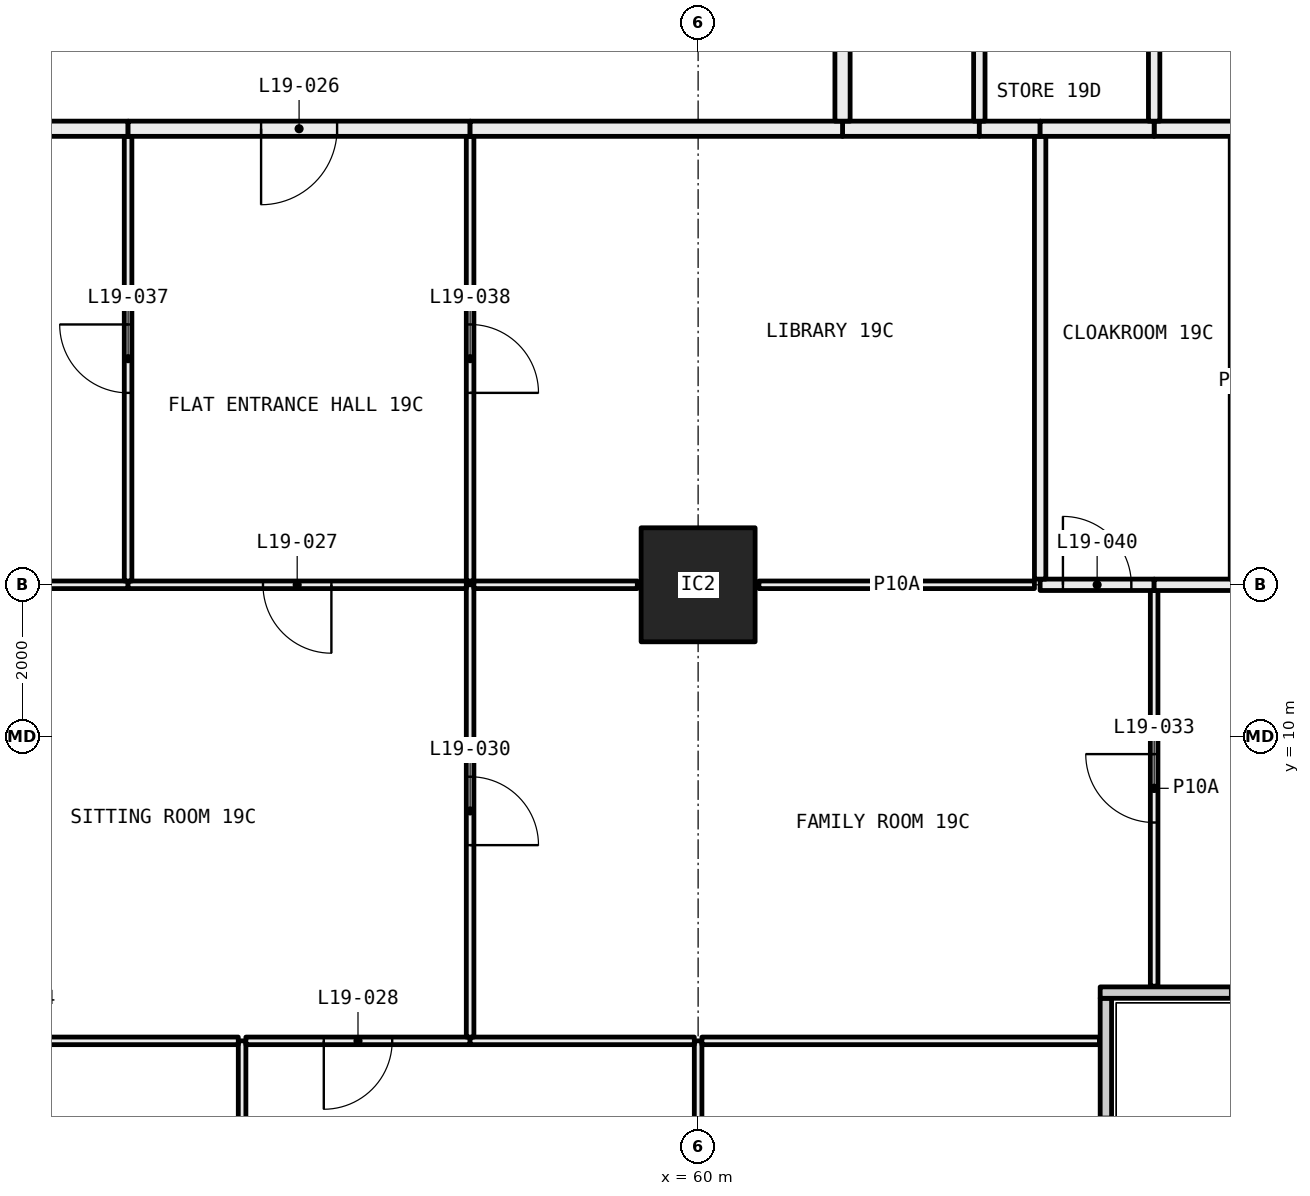
"""IFC4 building model, lengths in metres.
Left out: names, types, materials, properties, quantities, classifications, styles, units other than length and angle.
Written with IfcOpenShell. Run it as: python <this file> out.ifc"""

import sys

from ifc_helpers import new_model, si_unit, direction, frame, frame_2d, origin, origin_2d, place, context, subcontext, project, spatial, rectangle, hollow_rectangle, extrude, element, fill, save


model = new_model("IFC4")
c1 = context("Model", 3, precision=1e-05, world=origin(), true_north=direction((0.0, 1.0)))
c2 = subcontext(c1, "Body", "Model", "MODEL_VIEW")
j1 = project(units=[si_unit("LENGTHUNIT", "METRE"), si_unit("PLANEANGLEUNIT", "RADIAN")], contexts=[c1])
p1 = place(None, origin())
s1 = spatial("IfcSite", under=j1, at=p1, CompositionType="ELEMENT")
p2 = place(p1, origin())
s2 = spatial("IfcBuilding", under=s1, at=p2, CompositionType="ELEMENT")
p3 = place(p2, frame((0.0, 0.0, 78.3)))
s3 = spatial("IfcBuildingStorey", under=s2, at=p3, CompositionType="ELEMENT", Elevation=78.3)
p4 = place(p3, frame((60.0, 12.0, 0.0), z_axis=(0.0, 0.0, 1.0), x_axis=(1.0, 0.0, 0.0)))
e1 = element("IfcColumn", 1, at=p4, inside=s3, PredefinedType="COLUMN", context=c2, shape_type="SweptSolid", body=[
    extrude(hollow_rectangle(XDim=1.5, YDim=1.5, WallThickness=0.065, at=origin_2d()), origin(), (0.0, 0.0, 1.0), 3.05),
])
p5 = place(p3, frame((65.365, 0.71, 0.0), z_axis=(0.0, 0.0, 1.0), x_axis=(0.0, 1.0, 0.0)))
e2 = element("IfcWall", 2, at=p5, inside=s3, PredefinedType="ELEMENTEDWALL", context=c2, shape_type="SweptSolid", body=[
    extrude(rectangle(XDim=5.85, YDim=0.15, at=frame_2d((2.925, 0.0))), origin(), (0.0, 0.0, 1.0), 3.05),
])
p6 = place(p5, frame((0.29, 0.0, 0.45)))
e3 = element("IfcOpeningElement", 3, at=p6, cuts=e2, PredefinedType="OPENING", context=c2, shape_type="SweptSolid", body=[
    extrude(rectangle(XDim=4.0, YDim=2.55, at=frame_2d((2.0, 1.275))), frame((0.0, 0.085, 0.0), z_axis=(0.0, -1.0, 0.0), x_axis=(1.0, 0.0, 0.0)), (0.0, 0.0, 1.0), 0.17),
])
p7 = place(p3, frame((65.29, 6.635, 0.0), z_axis=(0.0, 0.0, 1.0), x_axis=(1.0, 0.0, 0.0)))
e4 = element("IfcWall", 4, at=p7, inside=s3, PredefinedType="ELEMENTEDWALL", context=c2, shape_type="SweptSolid", body=[
    extrude(rectangle(XDim=6.15, YDim=0.15, at=frame_2d((3.075, 0.0))), origin(), (0.0, 0.0, 1.0), 3.05),
])
p8 = place(p7, frame((1.71, 0.0, 0.45)))
e5 = element("IfcOpeningElement", 5, at=p8, cuts=e4, PredefinedType="OPENING", context=c2, shape_type="SweptSolid", body=[
    extrude(rectangle(XDim=4.0, YDim=2.55, at=frame_2d((2.0, 1.275))), frame((0.0, 0.085, 0.0), z_axis=(0.0, -1.0, 0.0), x_axis=(1.0, 0.0, 0.0)), (0.0, 0.0, 1.0), 0.17),
])
p9 = place(p3, frame((54.0, 0.72, 0.0), z_axis=(0.0, 0.0, 1.0), x_axis=(0.0, 1.0, 0.0)))
e6 = element("IfcWall", 6, at=p9, inside=s3, PredefinedType="PARTITIONING", context=c2, shape_type="SweptSolid", body=[
    extrude(rectangle(XDim=5.28, YDim=0.1, at=frame_2d((2.64, 0.0))), origin(), (0.0, 0.0, 1.0), 3.05),
])
p10 = place(p3, frame((53.95, 6.0, 0.0), z_axis=(0.0, 0.0, 1.0), x_axis=(-1.0, 0.0, 0.0)))
e7 = element("IfcWall", 7, at=p10, inside=s3, PredefinedType="PARTITIONING", context=c2, shape_type="SweptSolid", body=[
    extrude(rectangle(XDim=5.9, YDim=0.1, at=frame_2d((2.95, 0.0))), origin(), (0.0, 0.0, 1.0), 2.45),
])
p11 = place(p10, frame((2.5, 0.0, 0.0)))
e8 = element("IfcOpeningElement", 8, at=p11, cuts=e7, PredefinedType="OPENING", context=c2, shape_type="SweptSolid", body=[
    extrude(rectangle(XDim=0.9, YDim=2.1, at=frame_2d((0.45, 1.05))), frame((0.0, 0.06, 0.0), z_axis=(0.0, -1.0, 0.0), x_axis=(1.0, 0.0, 0.0)), (0.0, 0.0, 1.0), 0.12),
])
p12 = place(p3, frame((60.0, 0.72, 0.0), z_axis=(0.0, 0.0, 1.0), x_axis=(0.0, 1.0, 0.0)))
e9 = element("IfcWall", 9, at=p12, inside=s3, PredefinedType="PARTITIONING", context=c2, shape_type="SweptSolid", body=[
    extrude(rectangle(XDim=5.28, YDim=0.1, at=frame_2d((2.64, 0.0))), origin(), (0.0, 0.0, 1.0), 2.45),
])
p13 = place(p12, frame((2.19, 0.0, 0.0)))
e10 = element("IfcOpeningElement", 10, at=p13, cuts=e9, PredefinedType="OPENING", context=c2, shape_type="SweptSolid", body=[
    extrude(rectangle(XDim=0.9, YDim=2.1, at=frame_2d((0.45, 1.05))), frame((0.0, 0.06, 0.0), z_axis=(0.0, -1.0, 0.0), x_axis=(1.0, 0.0, 0.0)), (0.0, 0.0, 1.0), 0.12),
])
p14 = place(p3, frame((57.0, 6.0, 0.0), z_axis=(0.0, 0.0, 1.0), x_axis=(-1.0, 0.0, 0.0)))
e11 = element("IfcWall", 11, at=p14, inside=s3, PredefinedType="PARTITIONING", context=c2, shape_type="SweptSolid", body=[
    extrude(rectangle(XDim=2.95, YDim=0.1, at=frame_2d((1.475, 0.0))), origin(), (0.0, 0.0, 1.0), 3.05),
])
p15 = place(p14, frame((1.025, 0.0, 0.0)))
e12 = element("IfcOpeningElement", 12, at=p15, cuts=e11, PredefinedType="OPENING", context=c2, shape_type="SweptSolid", body=[
    extrude(rectangle(XDim=0.9, YDim=2.1, at=frame_2d((0.45, 1.05))), frame((0.0, 0.06, 0.0), z_axis=(0.0, -1.0, 0.0), x_axis=(1.0, 0.0, 0.0)), (0.0, 0.0, 1.0), 0.12),
])
p16 = place(p3, frame((59.95, 6.0, 0.0), z_axis=(0.0, 0.0, 1.0), x_axis=(-1.0, 0.0, 0.0)))
e13 = element("IfcWall", 13, at=p16, inside=s3, PredefinedType="PARTITIONING", context=c2, shape_type="SweptSolid", body=[
    extrude(rectangle(XDim=2.95, YDim=0.1, at=frame_2d((1.475, 0.0))), origin(), (0.0, 0.0, 1.0), 2.45),
])
p17 = place(p3, frame((65.28, 6.0, 0.0), z_axis=(0.0, 0.0, 1.0), x_axis=(-1.0, 0.0, 0.0)))
e14 = element("IfcWall", 14, at=p17, inside=s3, PredefinedType="PARTITIONING", context=c2, shape_type="SweptSolid", body=[
    extrude(rectangle(XDim=5.23, YDim=0.1, at=frame_2d((2.615, 0.0))), origin(), (0.0, 0.0, 1.0), 2.45),
])
p18 = place(p3, frame((57.0, 6.05, 0.0), z_axis=(0.0, 0.0, 1.0), x_axis=(0.0, 1.0, 0.0)))
e15 = element("IfcWall", 15, at=p18, inside=s3, PredefinedType="PARTITIONING", context=c2, shape_type="SweptSolid", body=[
    extrude(rectangle(XDim=5.95, YDim=0.1, at=frame_2d((2.975, 0.0))), origin(), (0.0, 0.0, 1.0), 2.45),
])
p19 = place(p18, frame((2.525, 0.0, 0.0)))
e16 = element("IfcOpeningElement", 16, at=p19, cuts=e15, PredefinedType="OPENING", context=c2, shape_type="SweptSolid", body=[
    extrude(rectangle(XDim=0.9, YDim=2.1, at=frame_2d((0.45, 1.05))), frame((0.0, 0.06, 0.0), z_axis=(0.0, -1.0, 0.0), x_axis=(1.0, 0.0, 0.0)), (0.0, 0.0, 1.0), 0.12),
])
p20 = place(p3, frame((52.5, 12.0, 0.0), z_axis=(0.0, 0.0, 1.0), x_axis=(-1.0, 0.0, 0.0)))
e17 = element("IfcWall", 17, at=p20, inside=s3, PredefinedType="PARTITIONING", context=c2, shape_type="SweptSolid", body=[
    extrude(rectangle(XDim=3.7, YDim=0.1, at=frame_2d((1.85, 0.0))), origin(), (0.0, 0.0, 1.0), 2.45),
])
p21 = place(p3, frame((56.95, 12.0, 0.0), z_axis=(0.0, 0.0, 1.0), x_axis=(-1.0, 0.0, 0.0)))
e18 = element("IfcWall", 18, at=p21, inside=s3, PredefinedType="PARTITIONING", context=c2, shape_type="SweptSolid", body=[
    extrude(rectangle(XDim=4.45, YDim=0.1, at=frame_2d((2.225, 0.0))), origin(), (0.0, 0.0, 1.0), 2.45),
])
p22 = place(p21, frame((1.775, 0.0, 0.0)))
e19 = element("IfcOpeningElement", 19, at=p22, cuts=e18, PredefinedType="OPENING", context=c2, shape_type="SweptSolid", body=[
    extrude(rectangle(XDim=0.9, YDim=2.1, at=frame_2d((0.45, 1.05))), frame((0.0, 0.06, 0.0), z_axis=(0.0, -1.0, 0.0), x_axis=(1.0, 0.0, 0.0)), (0.0, 0.0, 1.0), 0.12),
])
p23 = place(p3, frame((66.0, 6.72, 0.0), z_axis=(0.0, 0.0, 1.0), x_axis=(0.0, 1.0, 0.0)))
e20 = element("IfcWall", 20, at=p23, inside=s3, PredefinedType="PARTITIONING", context=c2, shape_type="SweptSolid", body=[
    extrude(rectangle(XDim=5.205, YDim=0.1, at=frame_2d((2.603, 0.0))), origin(), (0.0, 0.0, 1.0), 2.45),
])
p24 = place(p23, frame((2.153, 0.0, 0.0)))
e21 = element("IfcOpeningElement", 21, at=p24, cuts=e20, PredefinedType="OPENING", context=c2, shape_type="SweptSolid", body=[
    extrude(rectangle(XDim=0.9, YDim=2.1, at=frame_2d((0.45, 1.05))), frame((0.0, 0.06, 0.0), z_axis=(0.0, -1.0, 0.0), x_axis=(1.0, 0.0, 0.0)), (0.0, 0.0, 1.0), 0.12),
])
p25 = place(p3, frame((59.2, 12.0, 0.0), z_axis=(0.0, 0.0, 1.0), x_axis=(-1.0, 0.0, 0.0)))
e22 = element("IfcWall", 22, at=p25, inside=s3, PredefinedType="PARTITIONING", context=c2, shape_type="SweptSolid", body=[
    extrude(rectangle(XDim=2.15, YDim=0.1, at=frame_2d((1.075, 0.0))), origin(), (0.0, 0.0, 1.0), 2.45),
])
p26 = place(p3, frame((64.425, 12.0, 0.0), z_axis=(0.0, 0.0, 1.0), x_axis=(-1.0, 0.0, 0.0)))
e23 = element("IfcWall", 23, at=p26, inside=s3, PredefinedType="PARTITIONING", context=c2, shape_type="SweptSolid", body=[
    extrude(rectangle(XDim=3.625, YDim=0.1, at=frame_2d((1.812, 0.0))), origin(), (0.0, 0.0, 1.0), 2.45),
])
p27 = place(p3, frame((66.0, 12.0, 0.0), z_axis=(0.0, 0.0, 1.0), x_axis=(-1.0, 0.0, 0.0)))
e24 = element("IfcWall", 24, at=p27, inside=s3, PredefinedType="PARTITIONING", context=c2, shape_type="SweptSolid", body=[
    extrude(rectangle(XDim=1.5, YDim=0.15, at=frame_2d((0.75, 0.0))), origin(), (0.0, 0.0, 1.0), 2.45),
])
p28 = place(p27, frame((0.3, 0.0, 0.0)))
e25 = element("IfcOpeningElement", 25, at=p28, cuts=e24, PredefinedType="OPENING", context=c2, shape_type="SweptSolid", body=[
    extrude(rectangle(XDim=0.9, YDim=2.1, at=frame_2d((0.45, 1.05))), frame((0.0, 0.085, 0.0), z_axis=(0.0, -1.0, 0.0), x_axis=(1.0, 0.0, 0.0)), (0.0, 0.0, 1.0), 0.17),
])
p29 = place(p3, frame((67.076, 12.0, 0.0), z_axis=(0.0, 0.0, 1.0), x_axis=(-1.0, 0.0, 0.0)))
e26 = element("IfcWall", 26, at=p29, inside=s3, PredefinedType="PARTITIONING", context=c2, shape_type="SweptSolid", body=[
    extrude(rectangle(XDim=1.076, YDim=0.15, at=frame_2d((0.538, 0.0))), origin(), (0.0, 0.0, 1.0), 2.45),
])
p30 = place(p3, frame((52.5, 12.05, 0.0), z_axis=(0.0, 0.0, 1.0), x_axis=(0.0, 1.0, 0.0)))
e27 = element("IfcWall", 27, at=p30, inside=s3, PredefinedType="PARTITIONING", context=c2, shape_type="SweptSolid", body=[
    extrude(rectangle(XDim=5.85, YDim=0.1, at=frame_2d((2.925, 0.0))), origin(), (0.0, 0.0, 1.0), 2.45),
])
p31 = place(p30, frame((2.475, 0.0, 0.0)))
e28 = element("IfcOpeningElement", 28, at=p31, cuts=e27, PredefinedType="OPENING", context=c2, shape_type="SweptSolid", body=[
    extrude(rectangle(XDim=0.9, YDim=2.1, at=frame_2d((0.45, 1.05))), frame((0.0, 0.06, 0.0), z_axis=(0.0, -1.0, 0.0), x_axis=(1.0, 0.0, 0.0)), (0.0, 0.0, 1.0), 0.12),
])
p32 = place(p3, frame((52.5, 18.0, 0.0), z_axis=(0.0, 0.0, 1.0), x_axis=(-1.0, 0.0, 0.0)))
e29 = element("IfcWall", 29, at=p32, inside=s3, PredefinedType="PARTITIONING", context=c2, shape_type="SweptSolid", body=[
    extrude(rectangle(XDim=6.4, YDim=0.2, at=frame_2d((3.2, 0.0))), origin(), (0.0, 0.0, 1.0), 3.05),
])
p33 = place(p3, frame((57.0, 12.05, 0.0), z_axis=(0.0, 0.0, 1.0), x_axis=(0.0, 1.0, 0.0)))
e30 = element("IfcWall", 30, at=p33, inside=s3, PredefinedType="PARTITIONING", context=c2, shape_type="SweptSolid", body=[
    extrude(rectangle(XDim=5.85, YDim=0.1, at=frame_2d((2.925, 0.0))), origin(), (0.0, 0.0, 1.0), 2.45),
])
p34 = place(p33, frame((2.475, 0.0, 0.0)))
e31 = element("IfcOpeningElement", 31, at=p34, cuts=e30, PredefinedType="OPENING", context=c2, shape_type="SweptSolid", body=[
    extrude(rectangle(XDim=0.9, YDim=2.1, at=frame_2d((0.45, 1.05))), frame((0.0, 0.06, 0.0), z_axis=(0.0, -1.0, 0.0), x_axis=(1.0, 0.0, 0.0)), (0.0, 0.0, 1.0), 0.12),
])
p35 = place(p3, frame((57.0, 18.0, 0.0), z_axis=(0.0, 0.0, 1.0), x_axis=(-1.0, 0.0, 0.0)))
e32 = element("IfcWall", 32, at=p35, inside=s3, PredefinedType="PARTITIONING", context=c2, shape_type="SweptSolid", body=[
    extrude(rectangle(XDim=4.5, YDim=0.2, at=frame_2d((2.25, 0.0))), origin(), (0.0, 0.0, 1.0), 3.05),
])
p36 = place(p35, frame((1.75, 0.0, 0.0)))
e33 = element("IfcOpeningElement", 33, at=p36, cuts=e32, PredefinedType="OPENING", context=c2, shape_type="SweptSolid", body=[
    extrude(rectangle(XDim=1.0, YDim=2.1, at=frame_2d((0.5, 1.05))), frame((0.0, 0.11, 0.0), z_axis=(0.0, -1.0, 0.0), x_axis=(1.0, 0.0, 0.0)), (0.0, 0.0, 1.0), 0.22),
])
p37 = place(p3, frame((64.5, 12.075, 0.0), z_axis=(0.0, 0.0, 1.0), x_axis=(0.0, 1.0, 0.0)))
e34 = element("IfcWall", 34, at=p37, inside=s3, PredefinedType="PARTITIONING", context=c2, shape_type="SweptSolid", body=[
    extrude(rectangle(XDim=5.825, YDim=0.15, at=frame_2d((2.913, 0.0))), origin(), (0.0, 0.0, 1.0), 2.45),
])
p38 = place(p3, frame((63.7, 18.0, 0.0), z_axis=(0.0, 0.0, 1.0), x_axis=(-1.0, 0.0, 0.0)))
e35 = element("IfcWall", 35, at=p38, inside=s3, PredefinedType="PARTITIONING", context=c2, shape_type="SweptSolid", body=[
    extrude(rectangle(XDim=1.8, YDim=0.2, at=frame_2d((0.9, 0.0))), origin(), (0.0, 0.0, 1.0), 3.05),
])
p39 = place(p3, frame((64.5, 18.0, 0.0), z_axis=(0.0, 0.0, 1.0), x_axis=(-1.0, 0.0, 0.0)))
e36 = element("IfcWall", 36, at=p39, inside=s3, PredefinedType="PARTITIONING", context=c2, shape_type="SweptSolid", body=[
    extrude(rectangle(XDim=0.8, YDim=0.2, at=frame_2d((0.4, 0.0))), origin(), (0.0, 0.0, 1.0), 3.05),
])
p40 = place(p3, frame((61.9, 18.0, 0.0), z_axis=(0.0, 0.0, 1.0), x_axis=(-1.0, 0.0, 0.0)))
e37 = element("IfcWall", 37, at=p40, inside=s3, PredefinedType="PARTITIONING", context=c2, shape_type="SweptSolid", body=[
    extrude(rectangle(XDim=4.9, YDim=0.2, at=frame_2d((2.45, 0.0))), origin(), (0.0, 0.0, 1.0), 3.05),
])
p41 = place(p3, frame((67.076, 18.0, 0.0), z_axis=(0.0, 0.0, 1.0), x_axis=(-1.0, 0.0, 0.0)))
e38 = element("IfcWall", 38, at=p41, inside=s3, PredefinedType="PARTITIONING", context=c2, shape_type="SweptSolid", body=[
    extrude(rectangle(XDim=1.076, YDim=0.2, at=frame_2d((0.538, 0.0))), origin(), (0.0, 0.0, 1.0), 3.05),
])
p42 = place(p3, frame((66.0, 18.0, 0.0), z_axis=(0.0, 0.0, 1.0), x_axis=(-1.0, 0.0, 0.0)))
e39 = element("IfcWall", 39, at=p42, inside=s3, PredefinedType="PARTITIONING", context=c2, shape_type="SweptSolid", body=[
    extrude(rectangle(XDim=1.5, YDim=0.2, at=frame_2d((0.75, 0.0))), origin(), (0.0, 0.0, 1.0), 3.05),
])
p43 = place(p3, frame((66.0, 21.0, 0.0), z_axis=(0.0, 0.0, 1.0), x_axis=(0.0, -1.0, 0.0)))
e40 = element("IfcWall", 40, at=p43, inside=s3, PredefinedType="PARTITIONING", context=c2, shape_type="SweptSolid", body=[
    extrude(rectangle(XDim=2.9, YDim=0.15, at=frame_2d((1.45, 0.0))), origin(), (0.0, 0.0, 1.0), 3.05),
])
p44 = place(p43, frame((1.0, 0.0, 0.0)))
e41 = element("IfcOpeningElement", 41, at=p44, cuts=e40, PredefinedType="OPENING", context=c2, shape_type="SweptSolid", body=[
    extrude(rectangle(XDim=0.9, YDim=2.1, at=frame_2d((0.45, 1.05))), frame((0.0, 0.085, 0.0), z_axis=(0.0, -1.0, 0.0), x_axis=(1.0, 0.0, 0.0)), (0.0, 0.0, 1.0), 0.17),
])
p45 = place(p3, frame((63.7, 18.1, 0.0), z_axis=(0.0, 0.0, 1.0), x_axis=(0.0, 1.0, 0.0)))
e42 = element("IfcWall", 42, at=p45, inside=s3, PredefinedType="PARTITIONING", context=c2, shape_type="SweptSolid", body=[
    extrude(rectangle(XDim=2.9, YDim=0.15, at=frame_2d((1.45, 0.0))), origin(), (0.0, 0.0, 1.0), 3.05),
])
p46 = place(p3, frame((61.9, 21.0, 0.0), z_axis=(0.0, 0.0, 1.0), x_axis=(0.0, -1.0, 0.0)))
e43 = element("IfcWall", 43, at=p46, inside=s3, PredefinedType="PARTITIONING", context=c2, shape_type="SweptSolid", body=[
    extrude(rectangle(XDim=2.9, YDim=0.2, at=frame_2d((1.45, 0.0))), origin(), (0.0, 0.0, 1.0), 3.05),
])
p47 = place(p36, origin())
e44 = element("IfcDoor", 44, at=p47, inside=s3, OperationType="SINGLE_SWING_LEFT", PredefinedType="DOOR", context=c2, shape_type="SweptSolid", body=[
    extrude(rectangle(XDim=1.0, YDim=2.1, at=frame_2d((0.5, 1.05))), frame((0.0, 0.025, 0.0), z_axis=(0.0, -1.0, 0.0), x_axis=(1.0, 0.0, 0.0)), (0.0, 0.0, 1.0), 0.05),
])
fill(e33, e44)
p48 = place(p22, origin())
e45 = element("IfcDoor", 45, at=p48, inside=s3, OperationType="SINGLE_SWING_RIGHT", PredefinedType="DOOR", context=c2, shape_type="SweptSolid", body=[
    extrude(rectangle(XDim=0.9, YDim=2.1, at=frame_2d((0.45, 1.05))), frame((0.0, 0.025, 0.0), z_axis=(0.0, -1.0, 0.0), x_axis=(1.0, 0.0, 0.0)), (0.0, 0.0, 1.0), 0.05),
])
fill(e19, e45)
p49 = place(p15, origin())
e46 = element("IfcDoor", 46, at=p49, inside=s3, OperationType="SINGLE_SWING_LEFT", PredefinedType="DOOR", context=c2, shape_type="SweptSolid", body=[
    extrude(rectangle(XDim=0.9, YDim=2.1, at=frame_2d((0.45, 1.05))), frame((0.0, 0.025, 0.0), z_axis=(0.0, -1.0, 0.0), x_axis=(1.0, 0.0, 0.0)), (0.0, 0.0, 1.0), 0.05),
])
fill(e12, e46)
p50 = place(p19, frame((0.9, 0.0, 0.0), x_axis=(-1.0, 0.0, 0.0)))
e47 = element("IfcDoor", 47, at=p50, inside=s3, OperationType="SINGLE_SWING_LEFT", PredefinedType="DOOR", context=c2, shape_type="SweptSolid", body=[
    extrude(rectangle(XDim=0.9, YDim=2.1, at=frame_2d((0.45, 1.05))), frame((0.0, 0.025, 0.0), z_axis=(0.0, -1.0, 0.0), x_axis=(1.0, 0.0, 0.0)), (0.0, 0.0, 1.0), 0.05),
])
fill(e16, e47)
p51 = place(p24, origin())
e48 = element("IfcDoor", 48, at=p51, inside=s3, OperationType="SINGLE_SWING_LEFT", PredefinedType="DOOR", context=c2, shape_type="SweptSolid", body=[
    extrude(rectangle(XDim=0.9, YDim=2.1, at=frame_2d((0.45, 1.05))), frame((0.0, 0.025, 0.0), z_axis=(0.0, -1.0, 0.0), x_axis=(1.0, 0.0, 0.0)), (0.0, 0.0, 1.0), 0.05),
])
fill(e21, e48)
p52 = place(p31, origin())
e49 = element("IfcDoor", 49, at=p52, inside=s3, OperationType="SINGLE_SWING_LEFT", PredefinedType="DOOR", context=c2, shape_type="SweptSolid", body=[
    extrude(rectangle(XDim=0.9, YDim=2.1, at=frame_2d((0.45, 1.05))), frame((0.0, 0.025, 0.0), z_axis=(0.0, -1.0, 0.0), x_axis=(1.0, 0.0, 0.0)), (0.0, 0.0, 1.0), 0.05),
])
fill(e28, e49)
p53 = place(p34, frame((0.9, 0.0, 0.0), x_axis=(-1.0, 0.0, 0.0)))
e50 = element("IfcDoor", 50, at=p53, inside=s3, OperationType="SINGLE_SWING_LEFT", PredefinedType="DOOR", context=c2, shape_type="SweptSolid", body=[
    extrude(rectangle(XDim=0.9, YDim=2.1, at=frame_2d((0.45, 1.05))), frame((0.0, 0.025, 0.0), z_axis=(0.0, -1.0, 0.0), x_axis=(1.0, 0.0, 0.0)), (0.0, 0.0, 1.0), 0.05),
])
fill(e31, e50)
p54 = place(p28, frame((0.9, 0.0, 0.0), x_axis=(-1.0, 0.0, 0.0)))
e51 = element("IfcDoor", 51, at=p54, inside=s3, OperationType="SINGLE_SWING_RIGHT", PredefinedType="DOOR", context=c2, shape_type="SweptSolid", body=[
    extrude(rectangle(XDim=0.9, YDim=2.1, at=frame_2d((0.45, 1.05))), frame((0.0, 0.025, 0.0), z_axis=(0.0, -1.0, 0.0), x_axis=(1.0, 0.0, 0.0)), (0.0, 0.0, 1.0), 0.05),
])
fill(e25, e51)
save(model, sys.argv[1])
